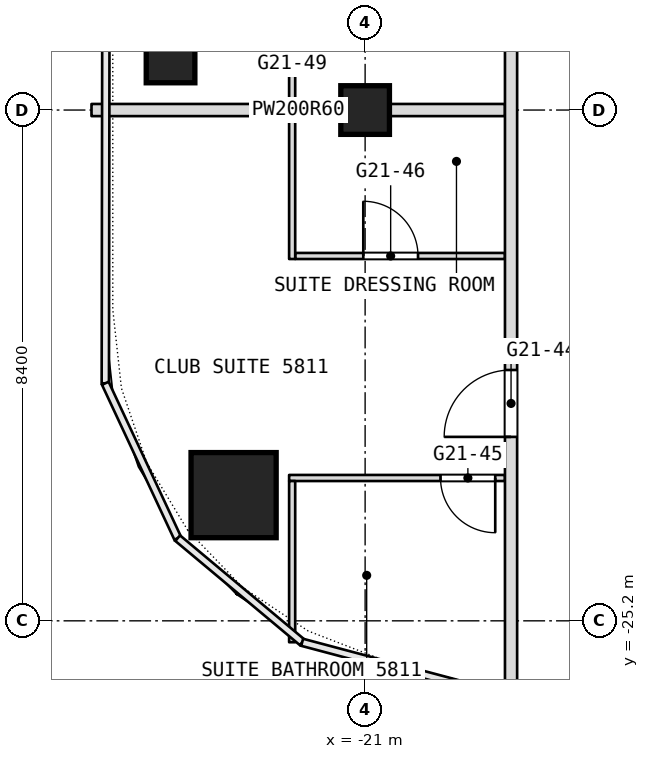
"""IFC4 building model, lengths in metres.
Left out: names, types, materials, properties, quantities, classifications, styles, units other than length and angle.
Written with IfcOpenShell. Run it as: python <this file> out.ifc"""

import sys

from ifc_helpers import new_model, si_unit, direction, frame, frame_2d, origin, origin_2d, place, context, subcontext, project, spatial, rectangle, extrude, element, fill, save


model = new_model("IFC4")
c1 = context("Model", 3, precision=1e-05, world=origin(), true_north=direction((0.0, 1.0)))
c2 = subcontext(c1, "Body", "Model", "MODEL_VIEW")
j1 = project(units=[si_unit("LENGTHUNIT", "METRE"), si_unit("PLANEANGLEUNIT", "RADIAN")], contexts=[c1])
p1 = place(None, origin())
s1 = spatial("IfcSite", under=j1, at=p1, CompositionType="ELEMENT")
p2 = place(p1, origin())
s2 = spatial("IfcBuilding", under=s1, at=p2, CompositionType="ELEMENT")
p3 = place(p2, frame((0.0, 0.0, 245.3)))
s3 = spatial("IfcBuildingStorey", under=s2, at=p3, CompositionType="ELEMENT", Elevation=245.3)
p4 = place(p3, frame((-23.163, -23.133, 0.0), z_axis=(0.0, 0.0, 1.0), x_axis=(1.0, 0.0, 0.0)))
e1 = element("IfcColumn", 1, at=p4, inside=s3, PredefinedType="COLUMN", context=c2, shape_type="SweptSolid", body=[
    extrude(rectangle(XDim=1.4, YDim=1.4, at=origin_2d()), origin(), (0.0, 0.0, 1.0), 3.6),
])
for number, where, z_axis, x_axis in (
    (2, (-21.0, -16.8, 0.0), (0.0, 0.0, 1.0), (1.0, 0.0, 0.0)),
    (3, (-24.2, -15.952, 0.0), (0.0, 0.0, 1.0), (1.0, 0.0, 0.0)),
):
    element("IfcColumn", number, at=place(p3, frame(where, z_axis=z_axis, x_axis=x_axis)), inside=s3, PredefinedType="COLUMN", context=c2, shape_type="SweptSolid", body=[
        extrude(rectangle(XDim=0.8, YDim=0.8, at=origin_2d()), origin(), (0.0, 0.0, 1.0), 3.6),
    ])
p5 = place(p3, frame((-22.25, -22.851, 0.0), z_axis=(0.0, 0.0, 1.0), x_axis=(1.0, 0.0, 0.0)))
e4 = element("IfcWall", 4, at=p5, inside=s3, PredefinedType="PARTITIONING", context=c2, shape_type="SweptSolid", body=[
    extrude(rectangle(XDim=3.55, YDim=0.1, at=frame_2d((1.775, 0.0))), origin(), (0.0, 0.0, 1.0), 3.34),
])
p6 = place(p5, frame((2.49, 0.0, 0.0)))
e5 = element("IfcOpeningElement", 5, at=p6, cuts=e4, PredefinedType="OPENING", context=c2, shape_type="SweptSolid", body=[
    extrude(rectangle(XDim=0.9, YDim=2.1, at=frame_2d((0.45, 1.05))), frame((0.0, 0.05, 0.0), z_axis=(0.0, -1.0, 0.0), x_axis=(1.0, 0.0, 0.0)), (0.0, 0.0, 1.0), 0.1),
])
p7 = place(p3, frame((-22.15, -19.2, 0.0), z_axis=(0.0, 0.0, 1.0), x_axis=(1.0, 0.0, 0.0)))
e6 = element("IfcWall", 6, at=p7, inside=s3, PredefinedType="PARTITIONING", context=c2, shape_type="SweptSolid", body=[
    extrude(rectangle(XDim=3.45, YDim=0.1, at=frame_2d((1.725, 0.0))), origin(), (0.0, 0.0, 1.0), 3.34),
])
p8 = place(p7, frame((1.12, 0.0, 0.0)))
e7 = element("IfcOpeningElement", 7, at=p8, cuts=e6, PredefinedType="OPENING", context=c2, shape_type="SweptSolid", body=[
    extrude(rectangle(XDim=0.9, YDim=2.1, at=frame_2d((0.45, 1.05))), frame((0.0, 0.05, 0.0), z_axis=(0.0, -1.0, 0.0), x_axis=(1.0, 0.0, 0.0)), (0.0, 0.0, 1.0), 0.1),
])
p9 = place(p3, frame((-25.5, -16.8, 0.0), z_axis=(0.0, 0.0, 1.0), x_axis=(1.0, 0.0, 0.0)))
e8 = element("IfcWall", 8, at=p9, inside=s3, PredefinedType="PARTITIONING", context=c2, shape_type="SweptSolid", body=[
    extrude(rectangle(XDim=6.8, YDim=0.2, at=frame_2d((3.4, 0.0))), origin(), (0.0, 0.0, 1.0), 2.94),
])
p10 = place(p3, frame((-18.6, -26.751, 0.0), z_axis=(0.0, 0.0, 1.0), x_axis=(0.0, 1.0, 0.0)))
e9 = element("IfcWall", 9, at=p10, inside=s3, PredefinedType="PARTITIONING", context=c2, shape_type="SweptSolid", body=[
    extrude(rectangle(XDim=49.091, YDim=0.2, at=frame_2d((24.545, 0.0))), origin(), (0.0, 0.0, 1.0), 3.34),
])
p11 = place(p10, frame((4.576, 0.0, 0.0)))
e10 = element("IfcOpeningElement", 10, at=p11, cuts=e9, PredefinedType="OPENING", context=c2, shape_type="SweptSolid", body=[
    extrude(rectangle(XDim=1.1, YDim=2.1, at=frame_2d((0.55, 1.05))), frame((0.0, 0.1, 0.0), z_axis=(0.0, -1.0, 0.0), x_axis=(1.0, 0.0, 0.0)), (0.0, 0.0, 1.0), 0.2),
])
p12 = place(p10, frame((13.551, 0.0, 0.0)))
e11 = element("IfcOpeningElement", 11, at=p12, cuts=e9, PredefinedType="OPENING", context=c2, shape_type="SweptSolid", body=[
    extrude(rectangle(XDim=1.1, YDim=2.1, at=frame_2d((0.55, 1.05))), frame((0.0, 0.1, 0.0), z_axis=(0.0, -1.0, 0.0), x_axis=(1.0, 0.0, 0.0)), (0.0, 0.0, 1.0), 0.2),
])
p13 = place(p10, frame((22.051, 0.0, 0.0)))
e12 = element("IfcOpeningElement", 12, at=p13, cuts=e9, PredefinedType="OPENING", context=c2, shape_type="SweptSolid", body=[
    extrude(rectangle(XDim=1.1, YDim=2.1, at=frame_2d((0.55, 1.05))), frame((0.0, 0.1, 0.0), z_axis=(0.0, -1.0, 0.0), x_axis=(1.0, 0.0, 0.0)), (0.0, 0.0, 1.0), 0.2),
])
p14 = place(p10, frame((30.351, 0.0, 0.0)))
e13 = element("IfcOpeningElement", 13, at=p14, cuts=e9, PredefinedType="OPENING", context=c2, shape_type="SweptSolid", body=[
    extrude(rectangle(XDim=1.1, YDim=2.1, at=frame_2d((0.55, 1.05))), frame((0.0, 0.1, 0.0), z_axis=(0.0, -1.0, 0.0), x_axis=(1.0, 0.0, 0.0)), (0.0, 0.0, 1.0), 0.2),
])
p15 = place(p10, frame((38.851, 0.0, 0.0)))
e14 = element("IfcOpeningElement", 14, at=p15, cuts=e9, PredefinedType="OPENING", context=c2, shape_type="SweptSolid", body=[
    extrude(rectangle(XDim=1.1, YDim=2.1, at=frame_2d((0.55, 1.05))), frame((0.0, 0.1, 0.0), z_axis=(0.0, -1.0, 0.0), x_axis=(1.0, 0.0, 0.0)), (0.0, 0.0, 1.0), 0.2),
])
p16 = place(p10, frame((44.051, 0.0, 0.0)))
e15 = element("IfcOpeningElement", 15, at=p16, cuts=e9, PredefinedType="OPENING", context=c2, shape_type="SweptSolid", body=[
    extrude(rectangle(XDim=1.0, YDim=2.1, at=frame_2d((0.5, 1.05))), frame((0.0, 0.1, 0.0), z_axis=(0.0, -1.0, 0.0), x_axis=(1.0, 0.0, 0.0)), (0.0, 0.0, 1.0), 0.2),
])
p17 = place(p3, frame((-22.2, -25.552, 0.0), z_axis=(0.0, 0.0, 1.0), x_axis=(0.0, 1.0, 0.0)))
e16 = element("IfcWall", 16, at=p17, inside=s3, PredefinedType="PARTITIONING", context=c2, shape_type="SweptSolid", body=[
    extrude(rectangle(XDim=2.651, YDim=0.1, at=frame_2d((1.326, 0.0))), origin(), (0.0, 0.0, 1.0), 3.34),
])
p18 = place(p3, frame((-22.2, -19.25, 0.0), z_axis=(0.0, 0.0, 1.0), x_axis=(0.0, 1.0, 0.0)))
e17 = element("IfcWall", 17, at=p18, inside=s3, PredefinedType="PARTITIONING", context=c2, shape_type="SweptSolid", body=[
    extrude(rectangle(XDim=4.8, YDim=0.1, at=frame_2d((2.4, 0.0))), origin(), (0.0, 0.0, 1.0), 3.34),
])
p19 = place(p18, frame((3.75, 0.0, 0.0)))
e18 = element("IfcOpeningElement", 18, at=p19, cuts=e17, PredefinedType="OPENING", context=c2, shape_type="SweptSolid", body=[
    extrude(rectangle(XDim=0.9, YDim=2.1, at=frame_2d((0.45, 1.05))), frame((0.0, 0.05, 0.0), z_axis=(0.0, -1.0, 0.0), x_axis=(1.0, 0.0, 0.0)), (0.0, 0.0, 1.0), 0.1),
])
p20 = place(p6, origin())
e19 = element("IfcDoor", 19, at=p20, inside=s3, OperationType="SINGLE_SWING_LEFT", PredefinedType="DOOR", context=c2, shape_type="SweptSolid", body=[
    extrude(rectangle(XDim=0.9, YDim=2.1, at=frame_2d((0.45, 1.05))), frame((0.0, 0.025, 0.0), z_axis=(0.0, -1.0, 0.0), x_axis=(1.0, 0.0, 0.0)), (0.0, 0.0, 1.0), 0.05),
])
fill(e5, e19)
p21 = place(p8, origin())
e20 = element("IfcDoor", 20, at=p21, inside=s3, OperationType="SINGLE_SWING_LEFT", PredefinedType="DOOR", context=c2, shape_type="SweptSolid", body=[
    extrude(rectangle(XDim=0.9, YDim=2.1, at=frame_2d((0.45, 1.05))), frame((0.0, 0.025, 0.0), z_axis=(0.0, -1.0, 0.0), x_axis=(1.0, 0.0, 0.0)), (0.0, 0.0, 1.0), 0.05),
])
fill(e7, e20)
p22 = place(p11, origin())
e21 = element("IfcDoor", 21, at=p22, inside=s3, OperationType="SINGLE_SWING_LEFT", PredefinedType="DOOR", context=c2, shape_type="SweptSolid", body=[
    extrude(rectangle(XDim=1.1, YDim=2.1, at=frame_2d((0.55, 1.05))), frame((0.0, 0.025, 0.0), z_axis=(0.0, -1.0, 0.0), x_axis=(1.0, 0.0, 0.0)), (0.0, 0.0, 1.0), 0.05),
])
fill(e10, e21)
save(model, sys.argv[1])
